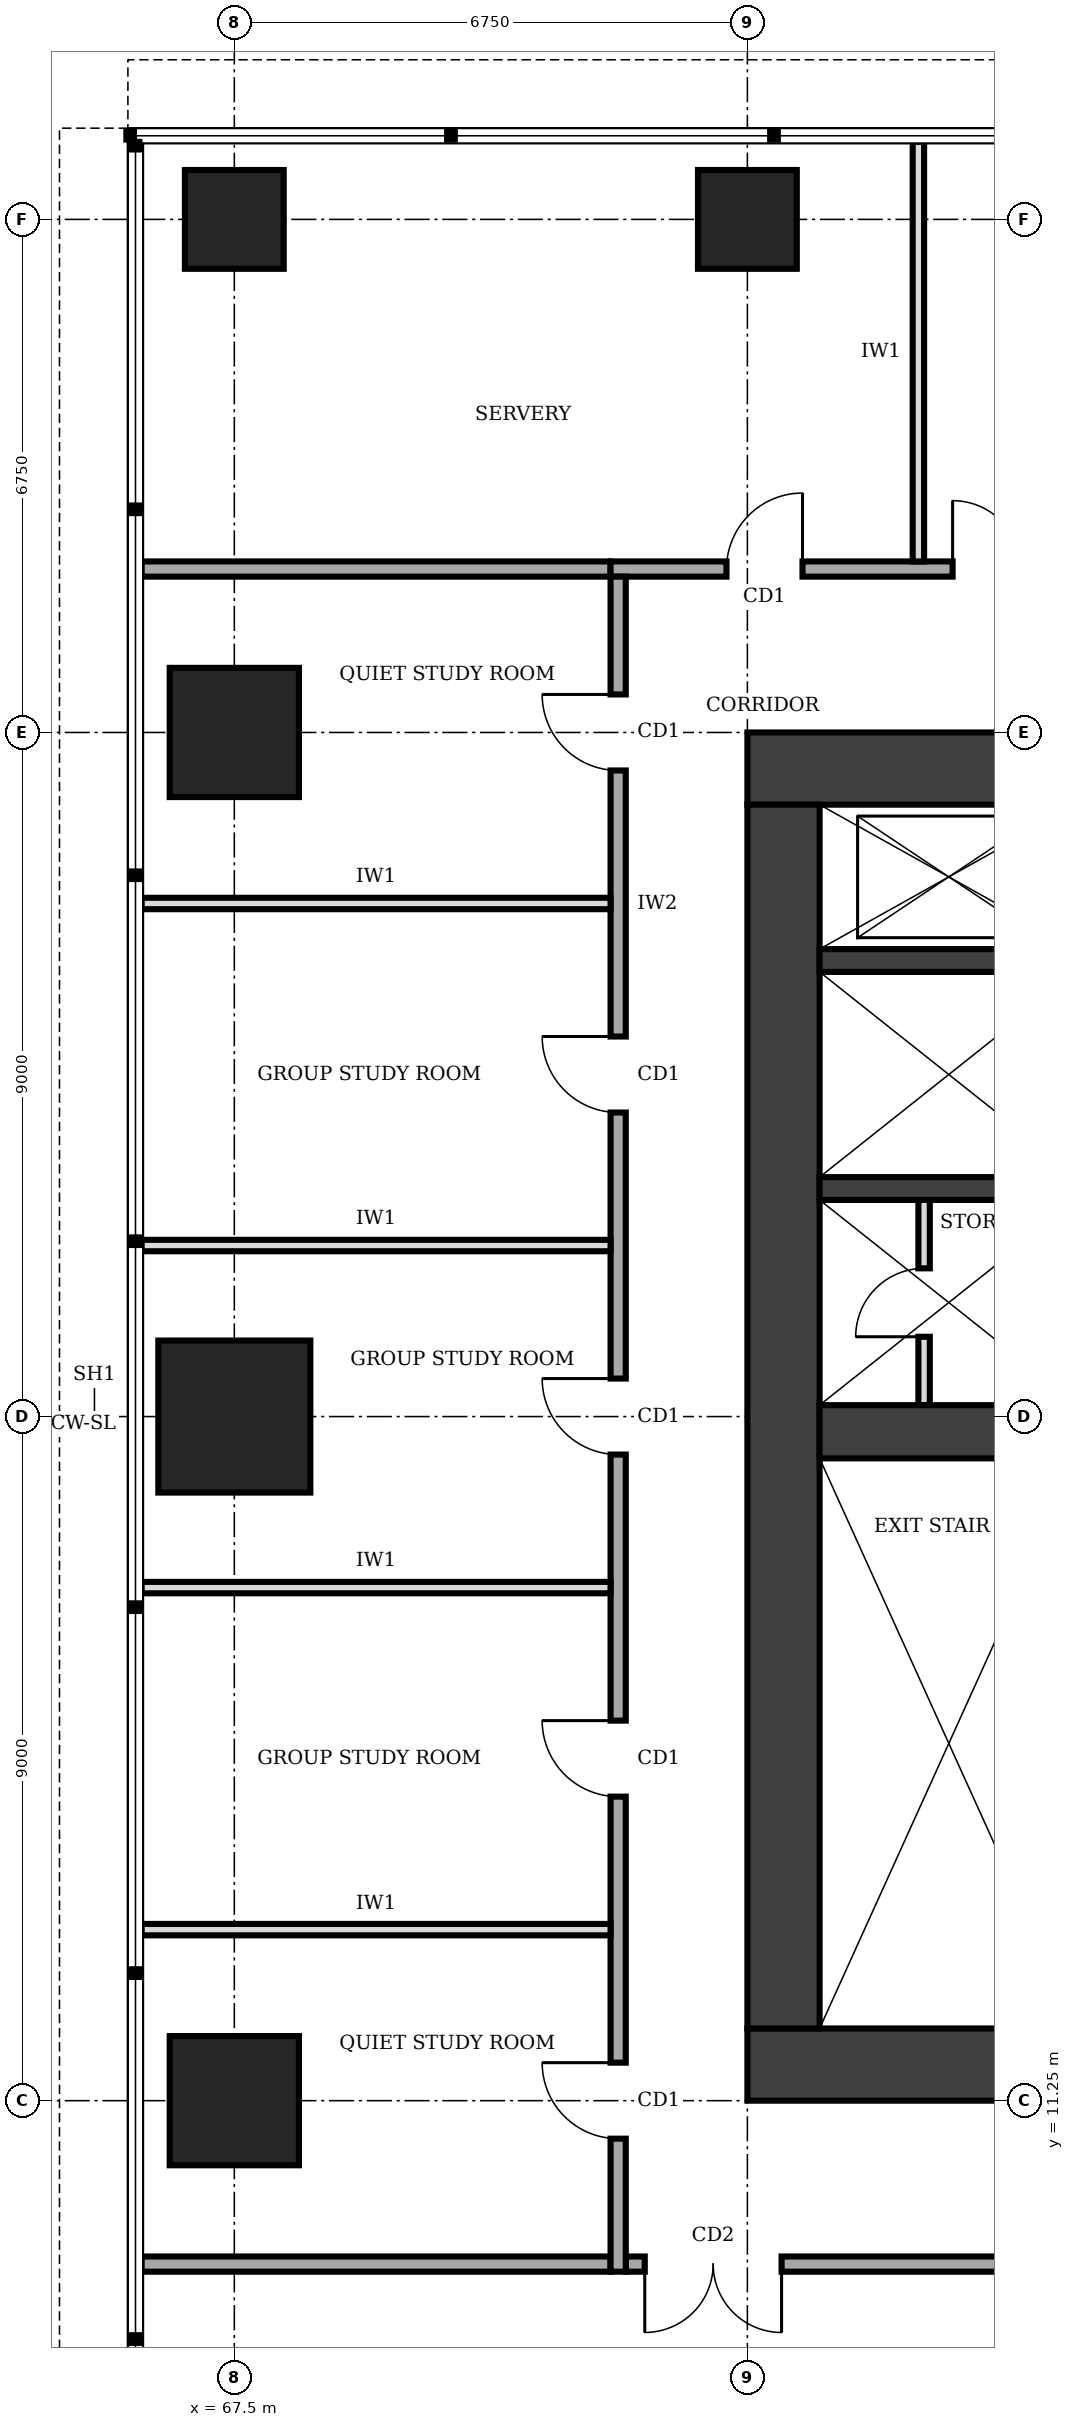
"""IFC4 building model, lengths in metres.
Left out: names, types, materials, properties, quantities, classifications, styles, units other than length and angle.
Written with IfcOpenShell. Run it as: python <this file> out.ifc"""

import sys

from ifc_helpers import new_model, si_unit, direction, frame, frame_2d, origin, origin_2d, place, context, subcontext, project, spatial, rectangle, extrude, element, fill, save


model = new_model("IFC4")
c1 = context("Model", 3, precision=1e-05, world=origin(), true_north=direction((0.0, 1.0)))
c2 = subcontext(c1, "Body", "Model", "MODEL_VIEW")
j1 = project(units=[si_unit("LENGTHUNIT", "METRE"), si_unit("PLANEANGLEUNIT", "RADIAN")], contexts=[c1])
p1 = place(None, origin())
s1 = spatial("IfcSite", under=j1, at=p1, CompositionType="ELEMENT")
p2 = place(p1, origin())
s2 = spatial("IfcBuilding", under=s1, at=p2, CompositionType="ELEMENT")
p3 = place(p2, frame((0.0, 0.0, 233.0)))
s3 = spatial("IfcBuildingStorey", under=s2, at=p3, CompositionType="ELEMENT", Elevation=233.0)
p4 = place(p3, frame((74.25, 11.725, 0.0), z_axis=(0.0, 0.0, 1.0), x_axis=(1.0, 0.0, 0.0)))
e1 = element("IfcWall", 1, at=p4, inside=s3, PredefinedType="SHEAR", context=c2, shape_type="SweptSolid", body=[
    extrude(rectangle(XDim=13.5, YDim=0.95, at=frame_2d((6.75, 0.0))), origin(), (0.0, 0.0, 1.0), 4.0),
])
p5 = place(p4, frame((4.75, 0.0, 0.0)))
e2 = element("IfcOpeningElement", 2, at=p5, cuts=e1, PredefinedType="OPENING", context=c2, shape_type="SweptSolid", body=[
    extrude(rectangle(XDim=1.0, YDim=2.1, at=frame_2d((0.5, 1.05))), frame((0.0, 0.485, 0.0), z_axis=(0.0, -1.0, 0.0), x_axis=(1.0, 0.0, 0.0)), (0.0, 0.0, 1.0), 0.97),
])
p6 = place(p3, frame((87.75, 28.775, 0.0), z_axis=(0.0, 0.0, 1.0), x_axis=(-1.0, 0.0, 0.0)))
e3 = element("IfcWall", 3, at=p6, inside=s3, PredefinedType="SHEAR", context=c2, shape_type="SweptSolid", body=[
    extrude(rectangle(XDim=13.5, YDim=0.95, at=frame_2d((6.75, 0.0))), origin(), (0.0, 0.0, 1.0), 4.0),
])
p7 = place(p6, frame((4.75, 0.0, 0.0)))
e4 = element("IfcOpeningElement", 4, at=p7, cuts=e3, PredefinedType="OPENING", context=c2, shape_type="SweptSolid", body=[
    extrude(rectangle(XDim=1.8, YDim=2.1, at=frame_2d((0.9, 1.05))), frame((0.0, 0.485, 0.0), z_axis=(0.0, -1.0, 0.0), x_axis=(1.0, 0.0, 0.0)), (0.0, 0.0, 1.0), 0.97),
])
p8 = place(p3, frame((74.725, 28.3, 0.0), z_axis=(0.0, 0.0, 1.0), x_axis=(0.0, -1.0, 0.0)))
e5 = element("IfcWall", 5, at=p8, inside=s3, PredefinedType="SHEAR", context=c2, shape_type="SweptSolid", body=[
    extrude(rectangle(XDim=16.1, YDim=0.95, at=frame_2d((8.05, 0.0))), origin(), (0.0, 0.0, 1.0), 4.0),
])
p9 = place(p3, frame((75.2, 20.05, 0.0), z_axis=(0.0, 0.0, 1.0), x_axis=(1.0, 0.0, 0.0)))
e6 = element("IfcWall", 6, at=p9, inside=s3, PredefinedType="SHEAR", context=c2, shape_type="SweptSolid", body=[
    extrude(rectangle(XDim=3.4, YDim=0.7, at=frame_2d((1.7, 0.0))), origin(), (0.0, 0.0, 1.0), 4.0),
])
for number, where, z_axis, x_axis in (
    (7, (75.2, 23.25, 0.0), (0.0, 0.0, 1.0), (1.0, 0.0, 0.0)),
    (8, (75.2, 26.25, 0.0), (0.0, 0.0, 1.0), (1.0, 0.0, 0.0)),
):
    element("IfcWall", number, at=place(p3, frame(where, z_axis=z_axis, x_axis=x_axis)), inside=s3, PredefinedType="SHEAR", context=c2, shape_type="SweptSolid", body=[
        extrude(rectangle(XDim=3.4, YDim=0.3, at=frame_2d((1.7, 0.0))), origin(), (0.0, 0.0, 1.0), 4.0),
    ])
p10 = place(p3, frame((67.5, 11.25, 0.0), z_axis=(0.0, 0.0, 1.0), x_axis=(1.0, 0.0, 0.0)))
e9 = element("IfcColumn", 9, at=p10, inside=s3, PredefinedType="COLUMN", context=c2, shape_type="SweptSolid", body=[
    extrude(rectangle(XDim=1.7, YDim=1.7, at=origin_2d()), origin(), (0.0, 0.0, 1.0), 4.0),
])
p11 = place(p3, frame((67.5, 20.25, 0.0), z_axis=(0.0, 0.0, 1.0), x_axis=(1.0, 0.0, 0.0)))
e10 = element("IfcColumn", 10, at=p11, inside=s3, PredefinedType="COLUMN", context=c2, shape_type="SweptSolid", body=[
    extrude(rectangle(XDim=2.0, YDim=2.0, at=origin_2d()), origin(), (0.0, 0.0, 1.0), 4.0),
])
p12 = place(p3, frame((67.5, 29.25, 0.0), z_axis=(0.0, 0.0, 1.0), x_axis=(1.0, 0.0, 0.0)))
e11 = element("IfcColumn", 11, at=p12, inside=s3, PredefinedType="COLUMN", context=c2, shape_type="SweptSolid", body=[
    extrude(rectangle(XDim=1.7, YDim=1.7, at=origin_2d()), origin(), (0.0, 0.0, 1.0), 4.0),
])
for number, where, z_axis, x_axis in (
    (12, (67.5, 36.0, 0.0), (0.0, 0.0, 1.0), (1.0, 0.0, 0.0)),
    (13, (74.25, 36.0, 0.0), (0.0, 0.0, 1.0), (1.0, 0.0, 0.0)),
):
    element("IfcColumn", number, at=place(p3, frame(where, z_axis=z_axis, x_axis=x_axis)), inside=s3, PredefinedType="COLUMN", context=c2, shape_type="SweptSolid", body=[
        extrude(rectangle(XDim=1.3, YDim=1.3, at=origin_2d()), origin(), (0.0, 0.0, 1.0), 4.0),
    ])
p13 = place(p3, frame((76.575, 20.4, 0.0), z_axis=(0.0, 0.0, 1.0), x_axis=(0.0, 1.0, 0.0)))
e14 = element("IfcWall", 14, at=p13, inside=s3, PredefinedType="PARTITIONING", context=c2, shape_type="SweptSolid", body=[
    extrude(rectangle(XDim=2.7, YDim=0.15, at=frame_2d((1.35, 0.0))), origin(), (0.0, 0.0, 1.0), 3.75),
])
p14 = place(p13, frame((0.9, 0.0, 0.0)))
e15 = element("IfcOpeningElement", 15, at=p14, cuts=e14, PredefinedType="OPENING", context=c2, shape_type="SweptSolid", body=[
    extrude(rectangle(XDim=0.9, YDim=2.1, at=frame_2d((0.45, 1.05))), frame((0.0, 0.085, 0.0), z_axis=(0.0, -1.0, 0.0), x_axis=(1.0, 0.0, 0.0)), (0.0, 0.0, 1.0), 0.17),
])
p15 = place(p3, frame((72.65, 9.1, 0.0), z_axis=(0.0, 0.0, 1.0), x_axis=(1.0, 0.0, 0.0)))
e16 = element("IfcWall", 16, at=p15, inside=s3, PredefinedType="SOLIDWALL", context=c2, shape_type="SweptSolid", body=[
    extrude(rectangle(XDim=16.9, YDim=0.2, at=frame_2d((8.45, 0.0))), origin(), (0.0, 0.0, 1.0), 3.75),
])
p16 = place(p15, frame((0.25, 0.0, 0.0)))
e17 = element("IfcOpeningElement", 17, at=p16, cuts=e16, PredefinedType="OPENING", context=c2, shape_type="SweptSolid", body=[
    extrude(rectangle(XDim=1.8, YDim=2.1, at=frame_2d((0.9, 1.05))), frame((0.0, 0.11, 0.0), z_axis=(0.0, -1.0, 0.0), x_axis=(1.0, 0.0, 0.0)), (0.0, 0.0, 1.0), 0.22),
])
p17 = place(p15, frame((10.6, 0.0, 0.0)))
e18 = element("IfcOpeningElement", 18, at=p17, cuts=e16, PredefinedType="OPENING", context=c2, shape_type="SweptSolid", body=[
    extrude(rectangle(XDim=1.8, YDim=2.1, at=frame_2d((0.9, 1.05))), frame((0.0, 0.11, 0.0), z_axis=(0.0, -1.0, 0.0), x_axis=(1.0, 0.0, 0.0)), (0.0, 0.0, 1.0), 0.22),
])
p18 = place(p15, frame((14.375, 0.0, 0.0)))
e19 = element("IfcOpeningElement", 19, at=p18, cuts=e16, PredefinedType="OPENING", context=c2, shape_type="SweptSolid", body=[
    extrude(rectangle(XDim=1.0, YDim=2.1, at=frame_2d((0.5, 1.05))), frame((0.0, 0.11, 0.0), z_axis=(0.0, -1.0, 0.0), x_axis=(1.0, 0.0, 0.0)), (0.0, 0.0, 1.0), 0.22),
])
p19 = place(p3, frame((89.35, 31.4, 0.0), z_axis=(0.0, 0.0, 1.0), x_axis=(-1.0, 0.0, 0.0)))
e20 = element("IfcWall", 20, at=p19, inside=s3, PredefinedType="SOLIDWALL", context=c2, shape_type="SweptSolid", body=[
    extrude(rectangle(XDim=16.9, YDim=0.2, at=frame_2d((8.45, 0.0))), origin(), (0.0, 0.0, 1.0), 3.75),
])
p20 = place(p19, frame((14.375, 0.0, 0.0)))
e21 = element("IfcOpeningElement", 21, at=p20, cuts=e20, PredefinedType="OPENING", context=c2, shape_type="SweptSolid", body=[
    extrude(rectangle(XDim=1.0, YDim=2.1, at=frame_2d((0.5, 1.05))), frame((0.0, 0.11, 0.0), z_axis=(0.0, -1.0, 0.0), x_axis=(1.0, 0.0, 0.0)), (0.0, 0.0, 1.0), 0.22),
])
p21 = place(p19, frame((10.6, 0.0, 0.0)))
e22 = element("IfcOpeningElement", 22, at=p21, cuts=e20, PredefinedType="OPENING", context=c2, shape_type="SweptSolid", body=[
    extrude(rectangle(XDim=1.8, YDim=2.1, at=frame_2d((0.9, 1.05))), frame((0.0, 0.11, 0.0), z_axis=(0.0, -1.0, 0.0), x_axis=(1.0, 0.0, 0.0)), (0.0, 0.0, 1.0), 0.22),
])
p22 = place(p19, frame((0.25, 0.0, 0.0)))
e23 = element("IfcOpeningElement", 23, at=p22, cuts=e20, PredefinedType="OPENING", context=c2, shape_type="SweptSolid", body=[
    extrude(rectangle(XDim=1.8, YDim=2.1, at=frame_2d((0.9, 1.05))), frame((0.0, 0.11, 0.0), z_axis=(0.0, -1.0, 0.0), x_axis=(1.0, 0.0, 0.0)), (0.0, 0.0, 1.0), 0.22),
])
p23 = place(p3, frame((72.55, 31.3, 0.0), z_axis=(0.0, 0.0, 1.0), x_axis=(0.0, -1.0, 0.0)))
e24 = element("IfcWall", 24, at=p23, inside=s3, PredefinedType="SOLIDWALL", context=c2, shape_type="SweptSolid", body=[
    extrude(rectangle(XDim=22.3, YDim=0.2, at=frame_2d((11.15, 0.0))), origin(), (0.0, 0.0, 1.0), 3.75),
])
p24 = place(p23, frame((19.55, 0.0, 0.0)))
e25 = element("IfcOpeningElement", 25, at=p24, cuts=e24, PredefinedType="OPENING", context=c2, shape_type="SweptSolid", body=[
    extrude(rectangle(XDim=1.0, YDim=2.1, at=frame_2d((0.5, 1.05))), frame((0.0, 0.11, 0.0), z_axis=(0.0, -1.0, 0.0), x_axis=(1.0, 0.0, 0.0)), (0.0, 0.0, 1.0), 0.22),
])
p25 = place(p23, frame((15.05, 0.0, 0.0)))
e26 = element("IfcOpeningElement", 26, at=p25, cuts=e24, PredefinedType="OPENING", context=c2, shape_type="SweptSolid", body=[
    extrude(rectangle(XDim=1.0, YDim=2.1, at=frame_2d((0.5, 1.05))), frame((0.0, 0.11, 0.0), z_axis=(0.0, -1.0, 0.0), x_axis=(1.0, 0.0, 0.0)), (0.0, 0.0, 1.0), 0.22),
])
p26 = place(p23, frame((10.55, 0.0, 0.0)))
e27 = element("IfcOpeningElement", 27, at=p26, cuts=e24, PredefinedType="OPENING", context=c2, shape_type="SweptSolid", body=[
    extrude(rectangle(XDim=1.0, YDim=2.1, at=frame_2d((0.5, 1.05))), frame((0.0, 0.11, 0.0), z_axis=(0.0, -1.0, 0.0), x_axis=(1.0, 0.0, 0.0)), (0.0, 0.0, 1.0), 0.22),
])
p27 = place(p23, frame((6.05, 0.0, 0.0)))
e28 = element("IfcOpeningElement", 28, at=p27, cuts=e24, PredefinedType="OPENING", context=c2, shape_type="SweptSolid", body=[
    extrude(rectangle(XDim=1.0, YDim=2.1, at=frame_2d((0.5, 1.05))), frame((0.0, 0.11, 0.0), z_axis=(0.0, -1.0, 0.0), x_axis=(1.0, 0.0, 0.0)), (0.0, 0.0, 1.0), 0.22),
])
p28 = place(p23, frame((1.55, 0.0, 0.0)))
e29 = element("IfcOpeningElement", 29, at=p28, cuts=e24, PredefinedType="OPENING", context=c2, shape_type="SweptSolid", body=[
    extrude(rectangle(XDim=1.0, YDim=2.1, at=frame_2d((0.5, 1.05))), frame((0.0, 0.11, 0.0), z_axis=(0.0, -1.0, 0.0), x_axis=(1.0, 0.0, 0.0)), (0.0, 0.0, 1.0), 0.22),
])
for number, where, z_axis, x_axis in (
    (30, (66.28, 9.1, 0.0), (0.0, 0.0, 1.0), (1.0, 0.0, 0.0)),
    (31, (66.28, 31.4, 0.0), (0.0, 0.0, 1.0), (1.0, 0.0, 0.0)),
):
    element("IfcWall", number, at=place(p3, frame(where, z_axis=z_axis, x_axis=x_axis)), inside=s3, PredefinedType="SOLIDWALL", context=c2, shape_type="SweptSolid", body=[
        extrude(rectangle(XDim=6.17, YDim=0.2, at=frame_2d((3.085, 0.0))), origin(), (0.0, 0.0, 1.0), 3.75),
    ])
p29 = place(p3, frame((76.5, 31.5, 0.0), z_axis=(0.0, 0.0, 1.0), x_axis=(0.0, 1.0, 0.0)))
e32 = element("IfcWall", 32, at=p29, inside=s3, PredefinedType="PARTITIONING", context=c2, shape_type="SweptSolid", body=[
    extrude(rectangle(XDim=5.52, YDim=0.15, at=frame_2d((2.76, 0.0))), origin(), (0.0, 0.0, 1.0), 3.75),
])
for number, where, z_axis, x_axis in (
    (33, (66.28, 13.5, 0.0), (0.0, 0.0, 1.0), (1.0, 0.0, 0.0)),
    (34, (66.28, 18.0, 0.0), (0.0, 0.0, 1.0), (1.0, 0.0, 0.0)),
    (35, (66.28, 22.5, 0.0), (0.0, 0.0, 1.0), (1.0, 0.0, 0.0)),
    (36, (66.28, 27.0, 0.0), (0.0, 0.0, 1.0), (1.0, 0.0, 0.0)),
):
    element("IfcWall", number, at=place(p3, frame(where, z_axis=z_axis, x_axis=x_axis)), inside=s3, PredefinedType="PARTITIONING", context=c2, shape_type="SweptSolid", body=[
        extrude(rectangle(XDim=6.17, YDim=0.15, at=frame_2d((3.085, 0.0))), origin(), (0.0, 0.0, 1.0), 3.75),
    ])
p30 = place(p14, origin())
e37 = element("IfcDoor", 37, at=p30, inside=s3, OperationType="SINGLE_SWING_LEFT", PredefinedType="DOOR", context=c2, shape_type="SweptSolid", body=[
    extrude(rectangle(XDim=0.9, YDim=2.1, at=frame_2d((0.45, 1.05))), frame((0.0, 0.025, 0.0), z_axis=(0.0, -1.0, 0.0), x_axis=(1.0, 0.0, 0.0)), (0.0, 0.0, 1.0), 0.05),
])
fill(e15, e37)
p31 = place(p16, frame((1.8, 0.0, 0.0), z_axis=(0.0, 0.0, 1.0), x_axis=(-1.0, 0.0, 0.0)))
e38 = element("IfcDoor", 38, at=p31, inside=s3, OperationType="DOUBLE_DOOR_SINGLE_SWING", PredefinedType="DOOR", context=c2, shape_type="SweptSolid", body=[
    extrude(rectangle(XDim=1.8, YDim=2.1, at=frame_2d((0.9, 1.05))), frame((0.0, 0.025, 0.0), z_axis=(0.0, -1.0, 0.0), x_axis=(1.0, 0.0, 0.0)), (0.0, 0.0, 1.0), 0.05),
])
fill(e17, e38)
p32 = place(p20, frame((1.0, 0.0, 0.0), z_axis=(0.0, 0.0, 1.0), x_axis=(-1.0, 0.0, 0.0)))
e39 = element("IfcDoor", 39, at=p32, inside=s3, OperationType="SINGLE_SWING_RIGHT", PredefinedType="DOOR", context=c2, shape_type="SweptSolid", body=[
    extrude(rectangle(XDim=1.0, YDim=2.1, at=frame_2d((0.5, 1.05))), frame((0.0, 0.025, 0.0), z_axis=(0.0, -1.0, 0.0), x_axis=(1.0, 0.0, 0.0)), (0.0, 0.0, 1.0), 0.05),
])
fill(e21, e39)
p33 = place(p21, frame((1.8, 0.0, 0.0), z_axis=(0.0, 0.0, 1.0), x_axis=(-1.0, 0.0, 0.0)))
e40 = element("IfcDoor", 40, at=p33, inside=s3, OperationType="DOUBLE_DOOR_SINGLE_SWING", PredefinedType="DOOR", context=c2, shape_type="SweptSolid", body=[
    extrude(rectangle(XDim=1.8, YDim=2.1, at=frame_2d((0.9, 1.05))), frame((0.0, 0.025, 0.0), z_axis=(0.0, -1.0, 0.0), x_axis=(1.0, 0.0, 0.0)), (0.0, 0.0, 1.0), 0.05),
])
fill(e22, e40)
p34 = place(p24, frame((1.0, 0.0, 0.0), z_axis=(0.0, 0.0, 1.0), x_axis=(-1.0, 0.0, 0.0)))
e41 = element("IfcDoor", 41, at=p34, inside=s3, OperationType="SINGLE_SWING_RIGHT", PredefinedType="DOOR", context=c2, shape_type="SweptSolid", body=[
    extrude(rectangle(XDim=1.0, YDim=2.1, at=frame_2d((0.5, 1.05))), frame((0.0, 0.025, 0.0), z_axis=(0.0, -1.0, 0.0), x_axis=(1.0, 0.0, 0.0)), (0.0, 0.0, 1.0), 0.05),
])
fill(e25, e41)
p35 = place(p25, frame((1.0, 0.0, 0.0), z_axis=(0.0, 0.0, 1.0), x_axis=(-1.0, 0.0, 0.0)))
e42 = element("IfcDoor", 42, at=p35, inside=s3, OperationType="SINGLE_SWING_RIGHT", PredefinedType="DOOR", context=c2, shape_type="SweptSolid", body=[
    extrude(rectangle(XDim=1.0, YDim=2.1, at=frame_2d((0.5, 1.05))), frame((0.0, 0.025, 0.0), z_axis=(0.0, -1.0, 0.0), x_axis=(1.0, 0.0, 0.0)), (0.0, 0.0, 1.0), 0.05),
])
fill(e26, e42)
p36 = place(p26, frame((1.0, 0.0, 0.0), z_axis=(0.0, 0.0, 1.0), x_axis=(-1.0, 0.0, 0.0)))
e43 = element("IfcDoor", 43, at=p36, inside=s3, OperationType="SINGLE_SWING_RIGHT", PredefinedType="DOOR", context=c2, shape_type="SweptSolid", body=[
    extrude(rectangle(XDim=1.0, YDim=2.1, at=frame_2d((0.5, 1.05))), frame((0.0, 0.025, 0.0), z_axis=(0.0, -1.0, 0.0), x_axis=(1.0, 0.0, 0.0)), (0.0, 0.0, 1.0), 0.05),
])
fill(e27, e43)
p37 = place(p27, frame((1.0, 0.0, 0.0), z_axis=(0.0, 0.0, 1.0), x_axis=(-1.0, 0.0, 0.0)))
e44 = element("IfcDoor", 44, at=p37, inside=s3, OperationType="SINGLE_SWING_RIGHT", PredefinedType="DOOR", context=c2, shape_type="SweptSolid", body=[
    extrude(rectangle(XDim=1.0, YDim=2.1, at=frame_2d((0.5, 1.05))), frame((0.0, 0.025, 0.0), z_axis=(0.0, -1.0, 0.0), x_axis=(1.0, 0.0, 0.0)), (0.0, 0.0, 1.0), 0.05),
])
fill(e28, e44)
p38 = place(p28, frame((1.0, 0.0, 0.0), z_axis=(0.0, 0.0, 1.0), x_axis=(-1.0, 0.0, 0.0)))
e45 = element("IfcDoor", 45, at=p38, inside=s3, OperationType="SINGLE_SWING_RIGHT", PredefinedType="DOOR", context=c2, shape_type="SweptSolid", body=[
    extrude(rectangle(XDim=1.0, YDim=2.1, at=frame_2d((0.5, 1.05))), frame((0.0, 0.025, 0.0), z_axis=(0.0, -1.0, 0.0), x_axis=(1.0, 0.0, 0.0)), (0.0, 0.0, 1.0), 0.05),
])
fill(e29, e45)
save(model, sys.argv[1])
